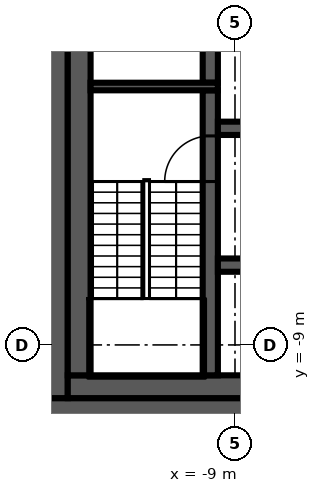
"""IFC4 building model, lengths in metres.
Left out: names, types, materials, properties, quantities, classifications, styles, units other than length and angle.
Written with IfcOpenShell. Run it as: python <this file> out.ifc"""

import sys

from ifc_helpers import new_model, si_unit, direction, frame, frame_2d, origin, place, context, subcontext, project, spatial, rectangle, extrude, element, fill, save


model = new_model("IFC4")
c1 = context("Model", 3, precision=1e-05, world=origin(), true_north=direction((0.0, 1.0)))
c2 = subcontext(c1, "Body", "Model", "MODEL_VIEW")
j1 = project(units=[si_unit("LENGTHUNIT", "METRE"), si_unit("PLANEANGLEUNIT", "RADIAN")], contexts=[c1])
p1 = place(None, origin())
s1 = spatial("IfcSite", under=j1, at=p1, CompositionType="ELEMENT")
p2 = place(p1, origin())
s2 = spatial("IfcBuilding", under=s1, at=p2, CompositionType="ELEMENT")
p3 = place(p2, frame((0.0, 0.0, 294.2)))
s3 = spatial("IfcBuildingStorey", under=s2, at=p3, CompositionType="ELEMENT", Elevation=294.2)
p4 = place(p3, frame((14.0, -10.7, 0.0), z_axis=(0.0, 0.0, 1.0), x_axis=(-1.0, 0.0, 0.0)))
e1 = element("IfcWall", 1, at=p4, inside=s3, PredefinedType="SHEAR", context=c2, shape_type="SweptSolid", body=[
    extrude(rectangle(XDim=28.0, YDim=0.6, at=frame_2d((14.0, 0.0))), origin(), (0.0, 0.0, 1.0), 3.82),
])
p5 = place(p4, frame((5.1, 0.0, 0.0)))
e2 = element("IfcOpeningElement", 2, at=p5, cuts=e1, PredefinedType="OPENING", context=c2, shape_type="SweptSolid", body=[
    extrude(rectangle(XDim=1.6, YDim=2.1, at=frame_2d((0.8, 1.05))), frame((0.0, 0.31, 0.0), z_axis=(0.0, -1.0, 0.0), x_axis=(1.0, 0.0, 0.0)), (0.0, 0.0, 1.0), 0.62),
])
p6 = place(p3, frame((-13.7, -10.4, 0.0), z_axis=(0.0, 0.0, 1.0), x_axis=(0.0, 1.0, 0.0)))
e3 = element("IfcWall", 3, at=p6, inside=s3, PredefinedType="SHEAR", context=c2, shape_type="SweptSolid", body=[
    extrude(rectangle(XDim=20.8, YDim=0.6, at=frame_2d((10.4, 0.0))), origin(), (0.0, 0.0, 1.0), 3.82),
])
p7 = place(p3, frame((6.9, -10.1, 0.0), z_axis=(0.0, 0.0, 1.0), x_axis=(-1.0, 0.0, 0.0)))
e4 = element("IfcWall", 4, at=p7, inside=s3, PredefinedType="SHEAR", context=c2, shape_type="SweptSolid", body=[
    extrude(rectangle(XDim=20.3, YDim=0.6, at=frame_2d((10.15, 0.0))), origin(), (0.0, 0.0, 1.0), 3.82),
])
p8 = place(p3, frame((-13.1, -9.8, 0.0), z_axis=(0.0, 0.0, 1.0), x_axis=(0.0, 1.0, 0.0)))
e5 = element("IfcWall", 5, at=p8, inside=s3, PredefinedType="SHEAR", context=c2, shape_type="SweptSolid", body=[
    extrude(rectangle(XDim=19.6, YDim=0.6, at=frame_2d((9.8, 0.0))), origin(), (0.0, 0.0, 1.0), 3.82),
])
p9 = place(p3, frame((-9.65, -9.8, 0.0), z_axis=(0.0, 0.0, 1.0), x_axis=(0.0, 1.0, 0.0)))
e6 = element("IfcWall", 6, at=p9, inside=s3, PredefinedType="SHEAR", context=c2, shape_type="SweptSolid", body=[
    extrude(rectangle(XDim=7.5, YDim=0.4, at=frame_2d((3.75, 0.0))), origin(), (0.0, 0.0, 1.0), 3.82),
])
p10 = place(p9, frame((5.1, 0.0, 0.0)))
e7 = element("IfcOpeningElement", 7, at=p10, cuts=e6, PredefinedType="OPENING", context=c2, shape_type="SweptSolid", body=[
    extrude(rectangle(XDim=1.2, YDim=2.1, at=frame_2d((0.6, 1.05))), frame((0.0, 0.21, 0.0), z_axis=(0.0, -1.0, 0.0), x_axis=(1.0, 0.0, 0.0)), (0.0, 0.0, 1.0), 0.42),
])
p11 = place(p3, frame((-9.65, -2.1, 0.0), z_axis=(0.0, 0.0, 1.0), x_axis=(0.0, 1.0, 0.0)))
e8 = element("IfcWall", 8, at=p11, inside=s3, PredefinedType="SHEAR", context=c2, shape_type="SweptSolid", body=[
    extrude(rectangle(XDim=4.2, YDim=0.4, at=frame_2d((2.1, 0.0))), origin(), (0.0, 0.0, 1.0), 3.82),
])
p12 = place(p3, frame((-9.45, -2.2, 0.0), z_axis=(0.0, 0.0, 1.0), x_axis=(-1.0, 0.0, 0.0)))
e9 = element("IfcWall", 9, at=p12, inside=s3, PredefinedType="SHEAR", context=c2, shape_type="SweptSolid", body=[
    extrude(rectangle(XDim=3.35, YDim=0.2, at=frame_2d((1.675, 0.0))), origin(), (0.0, 0.0, 1.0), 3.82),
])
p13 = place(p3, frame((-9.45, -3.3, 0.0), z_axis=(0.0, 0.0, 1.0), x_axis=(1.0, 0.0, 0.0)))
e10 = element("IfcWall", 10, at=p13, inside=s3, PredefinedType="SHEAR", context=c2, shape_type="SweptSolid", body=[
    extrude(rectangle(XDim=18.9, YDim=0.35, at=frame_2d((9.45, 0.0))), origin(), (0.0, 0.0, 1.0), 3.82),
])
p14 = place(p13, frame((17.0, 0.0, 0.0)))
e11 = element("IfcOpeningElement", 11, at=p14, cuts=e10, PredefinedType="OPENING", context=c2, shape_type="SweptSolid", body=[
    extrude(rectangle(XDim=1.1, YDim=2.1, at=frame_2d((0.55, 1.05))), frame((0.0, 0.185, 0.0), z_axis=(0.0, -1.0, 0.0), x_axis=(1.0, 0.0, 0.0)), (0.0, 0.0, 1.0), 0.37),
])
p15 = place(p13, frame((0.9, 0.0, 0.0)))
e12 = element("IfcOpeningElement", 12, at=p15, cuts=e10, PredefinedType="OPENING", context=c2, shape_type="SweptSolid", body=[
    extrude(rectangle(XDim=0.9, YDim=2.1, at=frame_2d((0.45, 1.05))), frame((0.0, 0.185, 0.0), z_axis=(0.0, -1.0, 0.0), x_axis=(1.0, 0.0, 0.0)), (0.0, 0.0, 1.0), 0.37),
])
p16 = place(p13, frame((4.95, 0.0, 0.0)))
e13 = element("IfcOpeningElement", 13, at=p16, cuts=e10, PredefinedType="OPENING", context=c2, shape_type="SweptSolid", body=[
    extrude(rectangle(XDim=0.9, YDim=2.1, at=frame_2d((0.45, 1.05))), frame((0.0, 0.185, 0.0), z_axis=(0.0, -1.0, 0.0), x_axis=(1.0, 0.0, 0.0)), (0.0, 0.0, 1.0), 0.37),
])
p17 = place(p13, frame((9.0, 0.0, 0.0)))
e14 = element("IfcOpeningElement", 14, at=p17, cuts=e10, PredefinedType="OPENING", context=c2, shape_type="SweptSolid", body=[
    extrude(rectangle(XDim=0.9, YDim=2.1, at=frame_2d((0.45, 1.05))), frame((0.0, 0.185, 0.0), z_axis=(0.0, -1.0, 0.0), x_axis=(1.0, 0.0, 0.0)), (0.0, 0.0, 1.0), 0.37),
])
p18 = place(p13, frame((11.7, 0.0, 0.0)))
e15 = element("IfcOpeningElement", 15, at=p18, cuts=e10, PredefinedType="OPENING", context=c2, shape_type="SweptSolid", body=[
    extrude(rectangle(XDim=0.9, YDim=2.1, at=frame_2d((0.45, 1.05))), frame((0.0, 0.185, 0.0), z_axis=(0.0, -1.0, 0.0), x_axis=(1.0, 0.0, 0.0)), (0.0, 0.0, 1.0), 0.37),
])
p19 = place(p13, frame((14.4, 0.0, 0.0)))
e16 = element("IfcOpeningElement", 16, at=p19, cuts=e10, PredefinedType="OPENING", context=c2, shape_type="SweptSolid", body=[
    extrude(rectangle(XDim=0.9, YDim=2.1, at=frame_2d((0.45, 1.05))), frame((0.0, 0.185, 0.0), z_axis=(0.0, -1.0, 0.0), x_axis=(1.0, 0.0, 0.0)), (0.0, 0.0, 1.0), 0.37),
])
p20 = place(p3, frame((9.45, -6.9, 0.0), z_axis=(0.0, 0.0, 1.0), x_axis=(-1.0, 0.0, 0.0)))
e17 = element("IfcWall", 17, at=p20, inside=s3, PredefinedType="SHEAR", context=c2, shape_type="SweptSolid", body=[
    extrude(rectangle(XDim=18.9, YDim=0.35, at=frame_2d((9.45, 0.0))), origin(), (0.0, 0.0, 1.0), 3.82),
])
p21 = place(p20, frame((17.0, 0.0, 0.0)))
e18 = element("IfcOpeningElement", 18, at=p21, cuts=e17, PredefinedType="OPENING", context=c2, shape_type="SweptSolid", body=[
    extrude(rectangle(XDim=1.1, YDim=2.1, at=frame_2d((0.55, 1.05))), frame((0.0, 0.185, 0.0), z_axis=(0.0, -1.0, 0.0), x_axis=(1.0, 0.0, 0.0)), (0.0, 0.0, 1.0), 0.37),
])
p22 = place(p20, frame((14.3, 0.0, 0.0)))
e19 = element("IfcOpeningElement", 19, at=p22, cuts=e17, PredefinedType="OPENING", context=c2, shape_type="SweptSolid", body=[
    extrude(rectangle(XDim=1.1, YDim=2.1, at=frame_2d((0.55, 1.05))), frame((0.0, 0.185, 0.0), z_axis=(0.0, -1.0, 0.0), x_axis=(1.0, 0.0, 0.0)), (0.0, 0.0, 1.0), 0.37),
])
p23 = place(p20, frame((11.6, 0.0, 0.0)))
e20 = element("IfcOpeningElement", 20, at=p23, cuts=e17, PredefinedType="OPENING", context=c2, shape_type="SweptSolid", body=[
    extrude(rectangle(XDim=1.1, YDim=2.1, at=frame_2d((0.55, 1.05))), frame((0.0, 0.185, 0.0), z_axis=(0.0, -1.0, 0.0), x_axis=(1.0, 0.0, 0.0)), (0.0, 0.0, 1.0), 0.37),
])
p24 = place(p20, frame((8.9, 0.0, 0.0)))
e21 = element("IfcOpeningElement", 21, at=p24, cuts=e17, PredefinedType="OPENING", context=c2, shape_type="SweptSolid", body=[
    extrude(rectangle(XDim=1.1, YDim=2.1, at=frame_2d((0.55, 1.05))), frame((0.0, 0.185, 0.0), z_axis=(0.0, -1.0, 0.0), x_axis=(1.0, 0.0, 0.0)), (0.0, 0.0, 1.0), 0.37),
])
p25 = place(p20, frame((0.75, 0.0, 0.0)))
e22 = element("IfcOpeningElement", 22, at=p25, cuts=e17, PredefinedType="OPENING", context=c2, shape_type="SweptSolid", body=[
    extrude(rectangle(XDim=1.2, YDim=2.1, at=frame_2d((0.6, 1.05))), frame((0.0, 0.185, 0.0), z_axis=(0.0, -1.0, 0.0), x_axis=(1.0, 0.0, 0.0)), (0.0, 0.0, 1.0), 0.37),
])
p26 = place(p20, frame((4.95, 0.0, 0.0)))
e23 = element("IfcOpeningElement", 23, at=p26, cuts=e17, PredefinedType="OPENING", context=c2, shape_type="SweptSolid", body=[
    extrude(rectangle(XDim=0.9, YDim=2.1, at=frame_2d((0.45, 1.05))), frame((0.0, 0.185, 0.0), z_axis=(0.0, -1.0, 0.0), x_axis=(1.0, 0.0, 0.0)), (0.0, 0.0, 1.0), 0.37),
])
p27 = place(p10, origin())
e24 = element("IfcDoor", 24, at=p27, inside=s3, OperationType="SINGLE_SWING_LEFT", PredefinedType="DOOR", context=c2, shape_type="SweptSolid", body=[
    extrude(rectangle(XDim=1.2, YDim=2.1, at=frame_2d((0.6, 1.05))), frame((0.0, 0.025, 0.0), z_axis=(0.0, -1.0, 0.0), x_axis=(1.0, 0.0, 0.0)), (0.0, 0.0, 1.0), 0.05),
])
fill(e7, e24)
save(model, sys.argv[1])
